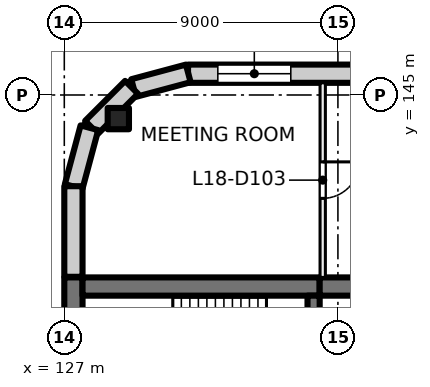
"""IFC4 building model, lengths in metres.
Left out: names, types, materials, properties, quantities, classifications, styles, units other than length and angle.
Written with IfcOpenShell. Run it as: python <this file> out.ifc"""

import sys

from ifc_helpers import new_model, si_unit, direction, frame, frame_2d, origin, origin_2d, place, context, subcontext, project, spatial, rectangle, extrude, element, fill, save


model = new_model("IFC4")
c1 = context("Model", 3, precision=1e-05, world=origin(), true_north=direction((0.0, 1.0)))
c2 = subcontext(c1, "Body", "Model", "MODEL_VIEW")
j1 = project(units=[si_unit("LENGTHUNIT", "METRE"), si_unit("PLANEANGLEUNIT", "RADIAN")], contexts=[c1])
p1 = place(None, origin())
s1 = spatial("IfcSite", under=j1, at=p1, CompositionType="ELEMENT")
p2 = place(p1, origin())
s2 = spatial("IfcBuilding", under=s1, at=p2, CompositionType="ELEMENT")
p3 = place(p2, frame((0.0, 0.0, 81.0)))
s3 = spatial("IfcBuildingStorey", under=s2, at=p3, CompositionType="ELEMENT", Elevation=81.0)
p4 = place(p3, frame((128.777, 144.223, 0.0), z_axis=(0.0, 0.0, 1.0), x_axis=(1.0, 0.0, 0.0)))
e1 = element("IfcColumn", 1, at=p4, inside=s3, PredefinedType="COLUMN", context=c2, shape_type="SweptSolid", body=[
    extrude(rectangle(XDim=0.7, YDim=0.7, at=origin_2d()), origin(), (0.0, 0.0, 1.0), 4.0),
])
p5 = place(p3, frame((127.3, 135.2, 0.0), z_axis=(0.0, 0.0, 1.0), x_axis=(0.0, 1.0, 0.0)))
e2 = element("IfcWall", 2, at=p5, inside=s3, PredefinedType="SHEAR", context=c2, shape_type="SweptSolid", body=[
    extrude(rectangle(XDim=3.8, YDim=0.6, at=frame_2d((1.9, 0.0))), origin(), (0.0, 0.0, 1.0), 4.0),
])
p6 = place(p3, frame((127.6, 138.7, 0.0), z_axis=(0.0, 0.0, 1.0), x_axis=(1.0, 0.0, 0.0)))
e3 = element("IfcWall", 3, at=p6, inside=s3, PredefinedType="SHEAR", context=c2, shape_type="SweptSolid", body=[
    extrude(rectangle(XDim=7.8, YDim=0.6, at=frame_2d((3.9, 0.0))), origin(), (0.0, 0.0, 1.0), 4.0),
])
p7 = place(p3, frame((135.4, 138.7, 0.0), z_axis=(0.0, 0.0, 1.0), x_axis=(1.0, 0.0, 0.0)))
e4 = element("IfcWall", 4, at=p7, inside=s3, PredefinedType="SHEAR", context=c2, shape_type="SweptSolid", body=[
    extrude(rectangle(XDim=4.6, YDim=0.6, at=frame_2d((2.3, 0.0))), origin(), (0.0, 0.0, 1.0), 4.0),
])
p8 = place(p3, frame((135.2, 135.6, 0.0), z_axis=(0.0, 0.0, 1.0), x_axis=(0.0, 1.0, 0.0)))
e5 = element("IfcWall", 5, at=p8, inside=s3, PredefinedType="SHEAR", context=c2, shape_type="SweptSolid", body=[
    extrude(rectangle(XDim=2.8, YDim=0.4, at=frame_2d((1.4, 0.0))), origin(), (0.0, 0.0, 1.0), 4.0),
])
p9 = place(p8, frame((0.9, 0.0, 0.0)))
e6 = element("IfcOpeningElement", 6, at=p9, cuts=e5, PredefinedType="OPENING", context=c2, shape_type="SweptSolid", body=[
    extrude(rectangle(XDim=1.0, YDim=2.1, at=frame_2d((0.5, 1.05))), frame((0.0, 0.21, 0.0), z_axis=(0.0, -1.0, 0.0), x_axis=(1.0, 0.0, 0.0)), (0.0, 0.0, 1.0), 0.42),
])
p10 = place(p3, frame((131.07, 145.7, 0.0), z_axis=(0.0, 0.0, 1.0), x_axis=(1.0, 0.0, 0.0)))
e7 = element("IfcWall", 7, at=p10, inside=s3, PredefinedType="SOLIDWALL", context=c2, shape_type="SweptSolid", body=[
    extrude(rectangle(XDim=31.93, YDim=0.6, at=frame_2d((15.965, 0.0))), origin(), (0.0, 0.0, 1.0), 3.625),
])
p11 = place(p10, frame((0.98, 0.0, 0.9)))
e8 = element("IfcOpeningElement", 8, at=p11, cuts=e7, PredefinedType="OPENING", context=c2, shape_type="SweptSolid", body=[
    extrude(rectangle(XDim=2.4, YDim=2.4, at=frame_2d((1.2, 1.2))), frame((0.0, 0.31, 0.0), z_axis=(0.0, -1.0, 0.0), x_axis=(1.0, 0.0, 0.0)), (0.0, 0.0, 1.0), 0.62),
])
p12 = place(p10, frame((5.48, 0.0, 0.9)))
e9 = element("IfcOpeningElement", 9, at=p12, cuts=e7, PredefinedType="OPENING", context=c2, shape_type="SweptSolid", body=[
    extrude(rectangle(XDim=2.4, YDim=2.4, at=frame_2d((1.2, 1.2))), frame((0.0, 0.31, 0.0), z_axis=(0.0, -1.0, 0.0), x_axis=(1.0, 0.0, 0.0)), (0.0, 0.0, 1.0), 0.62),
])
p13 = place(p10, frame((9.98, 0.0, 0.9)))
e10 = element("IfcOpeningElement", 10, at=p13, cuts=e7, PredefinedType="OPENING", context=c2, shape_type="SweptSolid", body=[
    extrude(rectangle(XDim=2.4, YDim=2.4, at=frame_2d((1.2, 1.2))), frame((0.0, 0.31, 0.0), z_axis=(0.0, -1.0, 0.0), x_axis=(1.0, 0.0, 0.0)), (0.0, 0.0, 1.0), 0.62),
])
p14 = place(p10, frame((14.48, 0.0, 0.9)))
e11 = element("IfcOpeningElement", 11, at=p14, cuts=e7, PredefinedType="OPENING", context=c2, shape_type="SweptSolid", body=[
    extrude(rectangle(XDim=2.4, YDim=2.4, at=frame_2d((1.2, 1.2))), frame((0.0, 0.31, 0.0), z_axis=(0.0, -1.0, 0.0), x_axis=(1.0, 0.0, 0.0)), (0.0, 0.0, 1.0), 0.62),
])
p15 = place(p10, frame((18.98, 0.0, 0.9)))
e12 = element("IfcOpeningElement", 12, at=p15, cuts=e7, PredefinedType="OPENING", context=c2, shape_type="SweptSolid", body=[
    extrude(rectangle(XDim=2.4, YDim=2.4, at=frame_2d((1.2, 1.2))), frame((0.0, 0.31, 0.0), z_axis=(0.0, -1.0, 0.0), x_axis=(1.0, 0.0, 0.0)), (0.0, 0.0, 1.0), 0.62),
])
p16 = place(p10, frame((23.48, 0.0, 0.9)))
e13 = element("IfcOpeningElement", 13, at=p16, cuts=e7, PredefinedType="OPENING", context=c2, shape_type="SweptSolid", body=[
    extrude(rectangle(XDim=2.4, YDim=2.4, at=frame_2d((1.2, 1.2))), frame((0.0, 0.31, 0.0), z_axis=(0.0, -1.0, 0.0), x_axis=(1.0, 0.0, 0.0)), (0.0, 0.0, 1.0), 0.62),
])
p17 = place(p10, frame((27.98, 0.0, 0.9)))
e14 = element("IfcOpeningElement", 14, at=p17, cuts=e7, PredefinedType="OPENING", context=c2, shape_type="SweptSolid", body=[
    extrude(rectangle(XDim=2.4, YDim=2.4, at=frame_2d((1.2, 1.2))), frame((0.0, 0.31, 0.0), z_axis=(0.0, -1.0, 0.0), x_axis=(1.0, 0.0, 0.0)), (0.0, 0.0, 1.0), 0.62),
])
for number, where, z_axis, x_axis in (
    (15, (129.281, 145.229, 0.0), (0.0, 0.0, 1.0), (0.966, 0.259, 0.0)),
    (16, (127.896, 143.936, 0.0), (0.0, 0.0, 1.0), (0.707, 0.707, 0.0)),
):
    element("IfcWall", number, at=place(p3, frame(where, z_axis=z_axis, x_axis=x_axis)), inside=s3, PredefinedType="SOLIDWALL", context=c2, shape_type="SweptSolid", body=[
        extrude(rectangle(XDim=1.861, YDim=0.6, at=frame_2d((0.93, 0.0))), origin(), (0.0, 0.0, 1.0), 3.625),
    ])
p18 = place(p3, frame((127.308, 141.99, 0.0), z_axis=(0.0, 0.0, 1.0), x_axis=(0.258839784042, 0.965920269068, 0.0)))
e17 = element("IfcWall", 17, at=p18, inside=s3, PredefinedType="SOLIDWALL", context=c2, shape_type="SweptSolid", body=[
    extrude(rectangle(XDim=2.0, YDim=0.6, at=frame_2d((1.0, 0.0))), origin(), (0.0, 0.0, 1.0), 3.625),
])
p19 = place(p3, frame((127.3, 139.02, 0.0), z_axis=(0.0, 0.0, 1.0), x_axis=(0.0, 1.0, 0.0)))
e18 = element("IfcWall", 18, at=p19, inside=s3, PredefinedType="SOLIDWALL", context=c2, shape_type="SweptSolid", body=[
    extrude(rectangle(XDim=2.98, YDim=0.6, at=frame_2d((1.49, 0.0))), origin(), (0.0, 0.0, 1.0), 3.625),
])
p20 = place(p3, frame((135.5, 145.4, 0.0), z_axis=(0.0, 0.0, 1.0), x_axis=(0.0, -1.0, 0.0)))
e19 = element("IfcWall", 19, at=p20, inside=s3, PredefinedType="PARTITIONING", context=c2, shape_type="SweptSolid", body=[
    extrude(rectangle(XDim=6.4, YDim=0.175, at=frame_2d((3.2, 0.0))), origin(), (0.0, 0.0, 1.0), 3.625),
])
p21 = place(p20, frame((2.6, 0.0, 0.0)))
e20 = element("IfcOpeningElement", 20, at=p21, cuts=e19, PredefinedType="OPENING", context=c2, shape_type="SweptSolid", body=[
    extrude(rectangle(XDim=1.2, YDim=2.1, at=frame_2d((0.6, 1.05))), frame((0.0, 0.097, 0.0), z_axis=(0.0, -1.0, 0.0), x_axis=(1.0, 0.0, 0.0)), (0.0, 0.0, 1.0), 0.195),
])
p22 = place(p11, origin())
e21 = element("IfcWindow", 21, at=p22, inside=s3, PartitioningType="SINGLE_PANEL", PredefinedType="WINDOW", context=c2, shape_type="SweptSolid", body=[
    extrude(rectangle(XDim=2.4, YDim=2.4, at=frame_2d((1.2, 1.2))), frame((0.0, 0.03, 0.0), z_axis=(0.0, -1.0, 0.0), x_axis=(1.0, 0.0, 0.0)), (0.0, 0.0, 1.0), 0.06),
])
fill(e8, e21)
p23 = place(p21, origin())
e22 = element("IfcDoor", 22, at=p23, inside=s3, OperationType="DOUBLE_DOOR_SINGLE_SWING", PredefinedType="DOOR", context=c2, shape_type="SweptSolid", body=[
    extrude(rectangle(XDim=1.2, YDim=2.1, at=frame_2d((0.6, 1.05))), frame((0.0, 0.025, 0.0), z_axis=(0.0, -1.0, 0.0), x_axis=(1.0, 0.0, 0.0)), (0.0, 0.0, 1.0), 0.05),
])
fill(e20, e22)
save(model, sys.argv[1])
